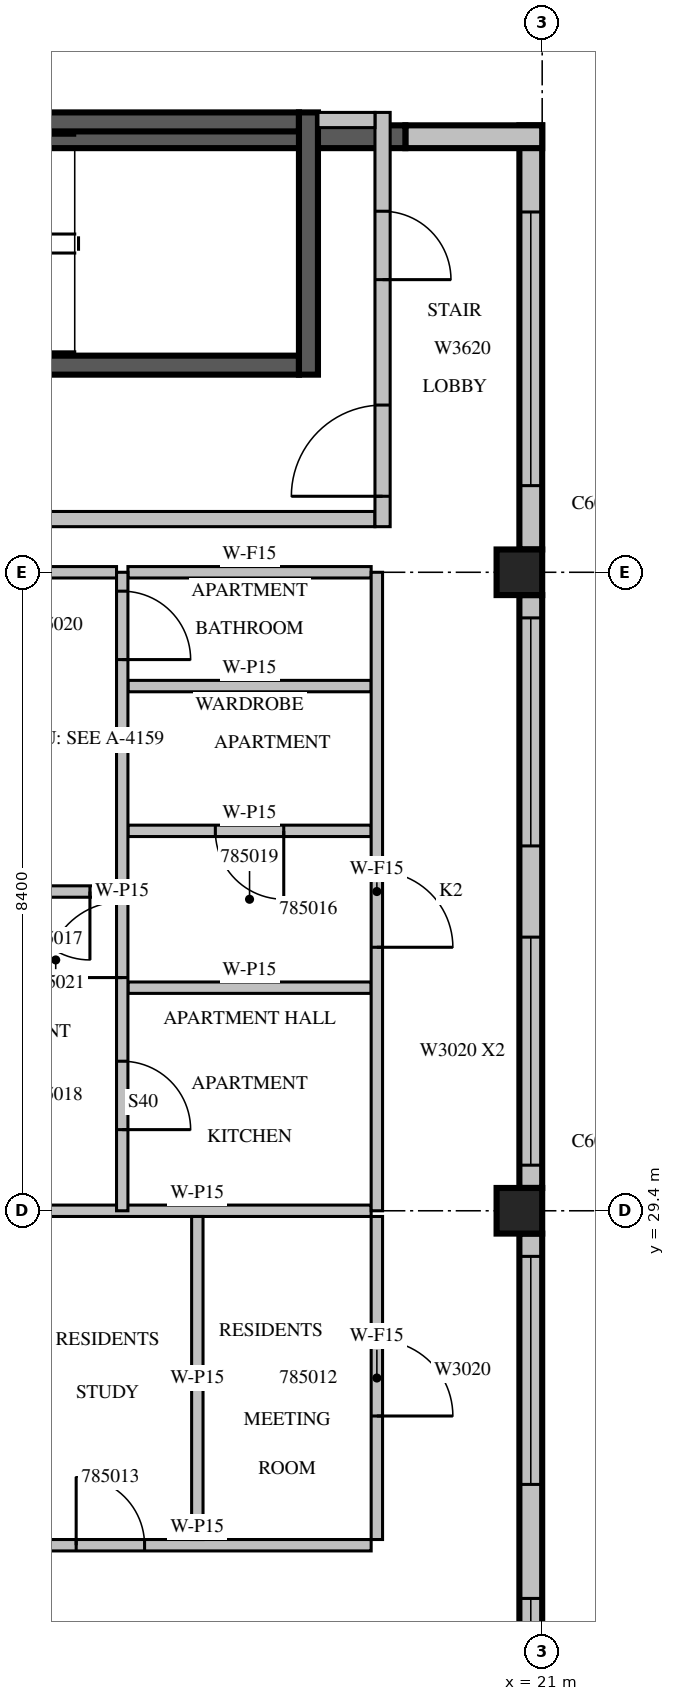
"""IFC4 building model, lengths in metres.
Left out: names, types, materials, properties, quantities, classifications, styles, units other than length and angle.
Written with IfcOpenShell. Run it as: python <this file> out.ifc"""

import sys

from ifc_helpers import new_model, si_unit, direction, frame, frame_2d, origin, origin_2d, place, context, subcontext, project, spatial, rectangle, extrude, source, transform, mapped, element, fill, save


model = new_model("IFC4")
c1 = context("Model", 3, precision=1e-05, world=origin(), true_north=direction((0.0, 1.0)))
c2 = subcontext(c1, "Body", "Model", "MODEL_VIEW")
j1 = project(units=[si_unit("LENGTHUNIT", "METRE"), si_unit("PLANEANGLEUNIT", "RADIAN")], contexts=[c1])
p1 = place(None, origin())
s1 = spatial("IfcSite", under=j1, at=p1, CompositionType="ELEMENT")
p2 = place(p1, origin())
s2 = spatial("IfcBuilding", under=s1, at=p2, CompositionType="ELEMENT")
p3 = place(p2, frame((0.0, 0.0, 358.0)))
s3 = spatial("IfcBuildingStorey", under=s2, at=p3, CompositionType="ELEMENT", Elevation=358.0)
m1 = source(origin(), c2, "Body", "SweptSolid", [
    extrude(rectangle(XDim=0.6, YDim=0.6, at=origin_2d()), origin(), (0.0, 0.0, 1.0), 3.5),
])
for number, where, z_axis, x_axis in (
    (1, (20.7, 29.4, 0.0), (0.0, 0.0, 1.0), (1.0, 0.0, 0.0)),
    (2, (20.7, 37.8, 0.0), (0.0, 0.0, 1.0), (1.0, 0.0, 0.0)),
):
    element("IfcColumn", number, at=place(p3, frame(where, z_axis=z_axis, x_axis=x_axis)), inside=s3, PredefinedType="COLUMN", context=c2, shape_type="MappedRepresentation", body=[
        mapped(m1, transform((0.0, 0.0, 0.0), scale=1.0)),
    ])
m2 = source(origin(), c2, "Body", "SweptSolid", [
    extrude(rectangle(XDim=7.5, YDim=0.3, at=frame_2d((3.75, 0.0))), origin(), (0.0, 0.0, 1.0), 3.1),
])
p4 = place(p3, frame((20.85, 21.6, 0.0), z_axis=(0.0, 0.0, 1.0), x_axis=(0.0, 1.0, 0.0)))
e3 = element("IfcWall", 3, at=p4, inside=s3, PredefinedType="STANDARD", context=c2, shape_type="MappedRepresentation", body=[
    mapped(m2, transform((0.0, 0.0, 0.0), scale=1.0)),
])
m3 = source(origin(), c2, "Body", "SweptSolid", [
    extrude(rectangle(XDim=2.4, YDim=2.0, at=frame_2d((1.2, 1.0))), frame((0.0, 0.16, 0.0), z_axis=(0.0, -1.0, 0.0), x_axis=(1.0, 0.0, 0.0)), (0.0, 0.0, 1.0), 0.32),
])
p5 = place(p4, frame((0.3, 0.0, 0.6)))
e4 = element("IfcOpeningElement", 4, at=p5, cuts=e3, PredefinedType="OPENING", context=c2, shape_type="MappedRepresentation", body=[
    mapped(m3, transform((0.0, 0.0, 0.0), scale=1.0)),
])
m4 = source(origin(), c2, "Body", "SweptSolid", [
    extrude(rectangle(XDim=3.0, YDim=2.0, at=frame_2d((1.5, 1.0))), frame((0.0, 0.16, 0.0), z_axis=(0.0, -1.0, 0.0), x_axis=(1.0, 0.0, 0.0)), (0.0, 0.0, 1.0), 0.32),
])
p6 = place(p4, frame((4.2, 0.0, 0.6)))
e5 = element("IfcOpeningElement", 5, at=p6, cuts=e3, PredefinedType="OPENING", context=c2, shape_type="MappedRepresentation", body=[
    mapped(m4, transform((0.0, 0.0, 0.0), scale=1.0)),
])
m5 = source(origin(), c2, "Body", "SweptSolid", [
    extrude(rectangle(XDim=7.8, YDim=0.3, at=frame_2d((3.9, 0.0))), origin(), (0.0, 0.0, 1.0), 3.1),
])
p7 = place(p3, frame((20.85, 29.7, 0.0), z_axis=(0.0, 0.0, 1.0), x_axis=(0.0, 1.0, 0.0)))
e6 = element("IfcWall", 6, at=p7, inside=s3, PredefinedType="STANDARD", context=c2, shape_type="MappedRepresentation", body=[
    mapped(m5, transform((0.0, 0.0, 0.0), scale=1.0)),
])
p8 = place(p7, frame((0.3, 0.0, 0.6)))
e7 = element("IfcOpeningElement", 7, at=p8, cuts=e6, PredefinedType="OPENING", context=c2, shape_type="MappedRepresentation", body=[
    mapped(m4, transform((0.0, 0.0, 0.0), scale=1.0)),
])
p9 = place(p7, frame((4.5, 0.0, 0.6)))
e8 = element("IfcOpeningElement", 8, at=p9, cuts=e6, PredefinedType="OPENING", context=c2, shape_type="MappedRepresentation", body=[
    mapped(m4, transform((0.0, 0.0, 0.0), scale=1.0)),
])
m6 = source(origin(), c2, "Body", "SweptSolid", [
    extrude(rectangle(XDim=5.58, YDim=0.3, at=frame_2d((2.79, 0.0))), origin(), (0.0, 0.0, 1.0), 3.1),
])
p10 = place(p3, frame((20.85, 38.1, 0.0), z_axis=(0.0, 0.0, 1.0), x_axis=(0.0, 1.0, 0.0)))
e9 = element("IfcWall", 9, at=p10, inside=s3, PredefinedType="STANDARD", context=c2, shape_type="MappedRepresentation", body=[
    mapped(m6, transform((0.0, 0.0, 0.0), scale=1.0)),
])
m7 = source(origin(), c2, "Body", "SweptSolid", [
    extrude(rectangle(XDim=3.6, YDim=2.0, at=frame_2d((1.8, 1.0))), frame((0.0, 0.16, 0.0), z_axis=(0.0, -1.0, 0.0), x_axis=(1.0, 0.0, 0.0)), (0.0, 0.0, 1.0), 0.32),
])
p11 = place(p10, frame((0.84, 0.0, 0.6)))
e10 = element("IfcOpeningElement", 10, at=p11, cuts=e9, PredefinedType="OPENING", context=c2, shape_type="MappedRepresentation", body=[
    mapped(m7, transform((0.0, 0.0, 0.0), scale=1.0)),
])
m8 = source(origin(), c2, "Body", "SweptSolid", [
    extrude(rectangle(XDim=1.8, YDim=0.3, at=frame_2d((0.9, 0.0))), origin(), (0.0, 0.0, 1.0), 3.1),
])
p12 = place(p3, frame((21.0, 43.53, 0.0), z_axis=(0.0, 0.0, 1.0), x_axis=(-1.0, 0.0, 0.0)))
e11 = element("IfcWall", 11, at=p12, inside=s3, PredefinedType="STANDARD", context=c2, shape_type="MappedRepresentation", body=[
    mapped(m8, transform((0.0, 0.0, 0.0), scale=1.0)),
])
m9 = source(origin(), c2, "Body", "SweptSolid", [
    extrude(rectangle(XDim=8.6, YDim=0.3, at=frame_2d((4.3, 0.0))), origin(), (0.0, 0.0, 1.0), 3.1),
])
p13 = place(p3, frame((19.2, 43.53, 0.0), z_axis=(0.0, 0.0, 1.0), x_axis=(-1.0, 0.0, 0.0)))
e12 = element("IfcWall", 12, at=p13, inside=s3, PredefinedType="SOLIDWALL", context=c2, shape_type="MappedRepresentation", body=[
    mapped(m9, transform((0.0, 0.0, 0.0), scale=1.0)),
])
m10 = source(origin(), c2, "Body", "SweptSolid", [
    extrude(rectangle(XDim=7.0, YDim=0.25, at=frame_2d((3.5, 0.0))), origin(), (0.0, 0.0, 1.0), 3.1),
])
p14 = place(p3, frame((10.8, 40.525, 0.0), z_axis=(0.0, 0.0, 1.0), x_axis=(1.0, 0.0, 0.0)))
e13 = element("IfcWall", 13, at=p14, inside=s3, PredefinedType="SOLIDWALL", context=c2, shape_type="MappedRepresentation", body=[
    mapped(m10, transform((0.0, 0.0, 0.0), scale=1.0)),
])
m11 = source(origin(), c2, "Body", "SweptSolid", [
    extrude(rectangle(XDim=1.1, YDim=2.1, at=frame_2d((0.55, 1.05))), frame((0.0, 0.135, 0.0), z_axis=(0.0, -1.0, 0.0), x_axis=(1.0, 0.0, 0.0)), (0.0, 0.0, 1.0), 0.27),
])
p15 = place(p14, frame((0.55, 0.0, 0.0)))
e14 = element("IfcOpeningElement", 14, at=p15, cuts=e13, PredefinedType="OPENING", context=c2, shape_type="MappedRepresentation", body=[
    mapped(m11, transform((0.0, 0.0, 0.0), scale=1.0)),
])
p16 = place(p3, frame((10.8, 43.725, 0.0), z_axis=(0.0, 0.0, 1.0), x_axis=(1.0, 0.0, 0.0)))
e15 = element("IfcWall", 15, at=p16, inside=s3, PredefinedType="SOLIDWALL", context=c2, shape_type="MappedRepresentation", body=[
    mapped(m10, transform((0.0, 0.0, 0.0), scale=1.0)),
])
m12 = source(origin(), c2, "Body", "SweptSolid", [
    extrude(rectangle(XDim=3.45, YDim=0.25, at=frame_2d((1.725, 0.0))), origin(), (0.0, 0.0, 1.0), 3.1),
])
p17 = place(p3, frame((17.925, 40.4, 0.0), z_axis=(0.0, 0.0, 1.0), x_axis=(0.0, 1.0, 0.0)))
e16 = element("IfcWall", 16, at=p17, inside=s3, PredefinedType="SOLIDWALL", context=c2, shape_type="MappedRepresentation", body=[
    mapped(m12, transform((0.0, 0.0, 0.0), scale=1.0)),
])
m13 = source(origin(), c2, "Body", "SweptSolid", [
    extrude(rectangle(XDim=8.0, YDim=0.2, at=frame_2d((4.0, 0.0))), origin(), (0.0, 0.0, 1.0), 3.1),
])
p18 = place(p3, frame((10.8, 38.5, 0.0), z_axis=(0.0, 0.0, 1.0), x_axis=(1.0, 0.0, 0.0)))
e17 = element("IfcWall", 17, at=p18, inside=s3, PredefinedType="PARTITIONING", context=c2, shape_type="MappedRepresentation", body=[
    mapped(m13, transform((0.0, 0.0, 0.0), scale=1.0)),
])
m14 = source(origin(), c2, "Body", "SweptSolid", [
    extrude(rectangle(XDim=5.45, YDim=0.2, at=frame_2d((2.725, 0.0))), origin(), (0.0, 0.0, 1.0), 3.1),
])
p19 = place(p3, frame((18.9, 38.4, 0.0), z_axis=(0.0, 0.0, 1.0), x_axis=(0.0, 1.0, 0.0)))
e18 = element("IfcWall", 18, at=p19, inside=s3, PredefinedType="PARTITIONING", context=c2, shape_type="MappedRepresentation", body=[
    mapped(m14, transform((0.0, 0.0, 0.0), scale=1.0)),
])
m15 = source(origin(), c2, "Body", "SweptSolid", [
    extrude(rectangle(XDim=1.2, YDim=2.1, at=frame_2d((0.6, 1.05))), frame((0.0, 0.11, 0.0), z_axis=(0.0, -1.0, 0.0), x_axis=(1.0, 0.0, 0.0)), (0.0, 0.0, 1.0), 0.22),
])
p20 = place(p19, frame((0.4, 0.0, 0.0)))
e19 = element("IfcOpeningElement", 19, at=p20, cuts=e18, PredefinedType="OPENING", context=c2, shape_type="MappedRepresentation", body=[
    mapped(m15, transform((0.0, 0.0, 0.0), scale=1.0)),
])
m16 = source(origin(), c2, "Body", "SweptSolid", [
    extrude(rectangle(XDim=0.9, YDim=2.1, at=frame_2d((0.45, 1.05))), frame((0.0, 0.11, 0.0), z_axis=(0.0, -1.0, 0.0), x_axis=(1.0, 0.0, 0.0)), (0.0, 0.0, 1.0), 0.22),
])
p21 = place(p19, frame((3.25, 0.0, 0.0)))
e20 = element("IfcOpeningElement", 20, at=p21, cuts=e18, PredefinedType="OPENING", context=c2, shape_type="MappedRepresentation", body=[
    mapped(m16, transform((0.0, 0.0, 0.0), scale=1.0)),
])
m17 = source(origin(), c2, "Body", "SweptSolid", [
    extrude(rectangle(XDim=0.75, YDim=0.2, at=frame_2d((0.375, 0.0))), origin(), (0.0, 0.0, 1.0), 3.1),
])
p22 = place(p3, frame((18.05, 43.75, 0.0), z_axis=(0.0, 0.0, 1.0), x_axis=(1.0, 0.0, 0.0)))
e21 = element("IfcWall", 21, at=p22, inside=s3, PredefinedType="PARTITIONING", context=c2, shape_type="MappedRepresentation", body=[
    mapped(m17, transform((0.0, 0.0, 0.0), scale=1.0)),
])
m18 = source(origin(), c2, "Body", "SweptSolid", [
    extrude(rectangle(XDim=4.575, YDim=0.15, at=frame_2d((2.288, 0.0))), origin(), (0.0, 0.0, 1.0), 3.1),
])
p23 = place(p3, frame((14.175, 25.0, 0.0), z_axis=(0.0, 0.0, 1.0), x_axis=(1.0, 0.0, 0.0)))
e22 = element("IfcWall", 22, at=p23, inside=s3, PredefinedType="PARTITIONING", context=c2, shape_type="MappedRepresentation", body=[
    mapped(m18, transform((0.0, 0.0, 0.0), scale=1.0)),
])
m19 = source(origin(), c2, "Body", "SweptSolid", [
    extrude(rectangle(XDim=0.9, YDim=2.1, at=frame_2d((0.45, 1.05))), frame((0.0, 0.085, 0.0), z_axis=(0.0, -1.0, 0.0), x_axis=(1.0, 0.0, 0.0)), (0.0, 0.0, 1.0), 0.17),
])
p24 = place(p23, frame((0.694, 0.0, 0.0)))
e23 = element("IfcOpeningElement", 23, at=p24, cuts=e22, PredefinedType="OPENING", context=c2, shape_type="MappedRepresentation", body=[
    mapped(m19, transform((0.0, 0.0, 0.0), scale=1.0)),
])
p25 = place(p3, frame((18.75, 29.4, 0.0), z_axis=(0.0, 0.0, 1.0), x_axis=(-1.0, 0.0, 0.0)))
e24 = element("IfcWall", 24, at=p25, inside=s3, PredefinedType="PARTITIONING", context=c2, shape_type="MappedRepresentation", body=[
    mapped(m18, transform((0.0, 0.0, 0.0), scale=1.0)),
])
m20 = source(origin(), c2, "Body", "SweptSolid", [
    extrude(rectangle(XDim=4.25, YDim=0.15, at=frame_2d((2.125, 0.0))), origin(), (0.0, 0.0, 1.0), 3.1),
])
p26 = place(p3, frame((18.825, 25.075, 0.0), z_axis=(0.0, 0.0, 1.0), x_axis=(0.0, 1.0, 0.0)))
e25 = element("IfcWall", 25, at=p26, inside=s3, PredefinedType="PARTITIONING", context=c2, shape_type="MappedRepresentation", body=[
    mapped(m20, transform((0.0, 0.0, 0.0), scale=1.0)),
])
m21 = source(origin(), c2, "Body", "SweptSolid", [
    extrude(rectangle(XDim=1.0, YDim=2.1, at=frame_2d((0.5, 1.05))), frame((0.0, 0.085, 0.0), z_axis=(0.0, -1.0, 0.0), x_axis=(1.0, 0.0, 0.0)), (0.0, 0.0, 1.0), 0.17),
])
p27 = place(p26, frame((1.625, 0.0, 0.0)))
e26 = element("IfcOpeningElement", 26, at=p27, cuts=e25, PredefinedType="OPENING", context=c2, shape_type="MappedRepresentation", body=[
    mapped(m21, transform((0.0, 0.0, 0.0), scale=1.0)),
])
p28 = place(p3, frame((16.463, 25.075, 0.0), z_axis=(0.0, 0.0, 1.0), x_axis=(0.0, 1.0, 0.0)))
e27 = element("IfcWall", 27, at=p28, inside=s3, PredefinedType="PARTITIONING", context=c2, shape_type="MappedRepresentation", body=[
    mapped(m20, transform((0.0, 0.0, 0.0), scale=1.0)),
])
p29 = place(p3, frame((15.4, 33.6, 0.0), z_axis=(0.0, 0.0, 1.0), x_axis=(-1.0, 0.0, 0.0)))
e28 = element("IfcWall", 28, at=p29, inside=s3, PredefinedType="PARTITIONING", context=c2, shape_type="SweptSolid", body=[
    extrude(rectangle(XDim=4.6, YDim=0.15, at=frame_2d((2.3, 0.0))), origin(), (0.0, 0.0, 1.0), 3.1),
])
p30 = place(p29, frame((0.35, 0.0, 0.0)))
e29 = element("IfcOpeningElement", 29, at=p30, cuts=e28, PredefinedType="OPENING", context=c2, shape_type="MappedRepresentation", body=[
    mapped(m19, transform((0.0, 0.0, 0.0), scale=1.0)),
])
m22 = source(origin(), c2, "Body", "SweptSolid", [
    extrude(rectangle(XDim=3.2, YDim=0.15, at=frame_2d((1.6, 0.0))), origin(), (0.0, 0.0, 1.0), 3.1),
])
p31 = place(p3, frame((18.75, 32.335, 0.0), z_axis=(0.0, 0.0, 1.0), x_axis=(-1.0, 0.0, 0.0)))
e30 = element("IfcWall", 30, at=p31, inside=s3, PredefinedType="PARTITIONING", context=c2, shape_type="MappedRepresentation", body=[
    mapped(m22, transform((0.0, 0.0, 0.0), scale=1.0)),
])
p32 = place(p3, frame((18.75, 34.398, 0.0), z_axis=(0.0, 0.0, 1.0), x_axis=(-1.0, 0.0, 0.0)))
e31 = element("IfcWall", 31, at=p32, inside=s3, PredefinedType="PARTITIONING", context=c2, shape_type="MappedRepresentation", body=[
    mapped(m22, transform((0.0, 0.0, 0.0), scale=1.0)),
])
p33 = place(p32, frame((1.15, 0.0, 0.0)))
e32 = element("IfcOpeningElement", 32, at=p33, cuts=e31, PredefinedType="OPENING", context=c2, shape_type="MappedRepresentation", body=[
    mapped(m19, transform((0.0, 0.0, 0.0), scale=1.0)),
])
p34 = place(p3, frame((18.75, 36.303, 0.0), z_axis=(0.0, 0.0, 1.0), x_axis=(-1.0, 0.0, 0.0)))
e33 = element("IfcWall", 33, at=p34, inside=s3, PredefinedType="PARTITIONING", context=c2, shape_type="MappedRepresentation", body=[
    mapped(m22, transform((0.0, 0.0, 0.0), scale=1.0)),
])
m23 = source(origin(), c2, "Body", "SweptSolid", [
    extrude(rectangle(XDim=4.301, YDim=0.15, at=frame_2d((2.151, 0.0))), origin(), (0.0, 0.0, 1.0), 3.1),
])
p35 = place(p3, frame((15.4, 37.8, 0.0), z_axis=(0.0, 0.0, 1.0), x_axis=(-1.0, 0.0, 0.0)))
e34 = element("IfcWall", 34, at=p35, inside=s3, PredefinedType="PARTITIONING", context=c2, shape_type="MappedRepresentation", body=[
    mapped(m23, transform((0.0, 0.0, 0.0), scale=1.0)),
])
p36 = place(p3, frame((18.75, 37.8, 0.0), z_axis=(0.0, 0.0, 1.0), x_axis=(-1.0, 0.0, 0.0)))
e35 = element("IfcWall", 35, at=p36, inside=s3, PredefinedType="PARTITIONING", context=c2, shape_type="MappedRepresentation", body=[
    mapped(m22, transform((0.0, 0.0, 0.0), scale=1.0)),
])
m24 = source(origin(), c2, "Body", "SweptSolid", [
    extrude(rectangle(XDim=8.4, YDim=0.15, at=frame_2d((4.2, 0.0))), origin(), (0.0, 0.0, 1.0), 3.1),
])
p37 = place(p3, frame((15.475, 29.4, 0.0), z_axis=(0.0, 0.0, 1.0), x_axis=(0.0, 1.0, 0.0)))
e36 = element("IfcWall", 36, at=p37, inside=s3, PredefinedType="PARTITIONING", context=c2, shape_type="MappedRepresentation", body=[
    mapped(m24, transform((0.0, 0.0, 0.0), scale=1.0)),
])
p38 = place(p37, frame((3.068, 0.0, 0.0)))
e37 = element("IfcOpeningElement", 37, at=p38, cuts=e36, PredefinedType="OPENING", context=c2, shape_type="MappedRepresentation", body=[
    mapped(m21, transform((0.0, 0.0, 0.0), scale=1.0)),
])
p39 = place(p37, frame((1.067, 0.0, 0.0)))
e38 = element("IfcOpeningElement", 38, at=p39, cuts=e36, PredefinedType="OPENING", context=c2, shape_type="MappedRepresentation", body=[
    mapped(m19, transform((0.0, 0.0, 0.0), scale=1.0)),
])
p40 = place(p37, frame((7.252, 0.0, 0.0)))
e39 = element("IfcOpeningElement", 39, at=p40, cuts=e36, PredefinedType="OPENING", context=c2, shape_type="MappedRepresentation", body=[
    mapped(m19, transform((0.0, 0.0, 0.0), scale=1.0)),
])
p41 = place(p3, frame((18.825, 29.4, 0.0), z_axis=(0.0, 0.0, 1.0), x_axis=(0.0, 1.0, 0.0)))
e40 = element("IfcWall", 40, at=p41, inside=s3, PredefinedType="PARTITIONING", context=c2, shape_type="MappedRepresentation", body=[
    mapped(m24, transform((0.0, 0.0, 0.0), scale=1.0)),
])
p42 = place(p41, frame((3.467, 0.0, 0.0)))
e41 = element("IfcOpeningElement", 41, at=p42, cuts=e40, PredefinedType="OPENING", context=c2, shape_type="MappedRepresentation", body=[
    mapped(m21, transform((0.0, 0.0, 0.0), scale=1.0)),
])
m25 = source(origin(), c2, "Body", "SweptSolid", [
    extrude(rectangle(XDim=2.4, YDim=2.0, at=frame_2d((1.2, 1.0))), frame((0.0, 0.03, 0.0), z_axis=(0.0, -1.0, 0.0), x_axis=(1.0, 0.0, 0.0)), (0.0, 0.0, 1.0), 0.06),
])
p43 = place(p5, origin())
e42 = element("IfcWindow", 42, at=p43, inside=s3, PartitioningType="SINGLE_PANEL", PredefinedType="WINDOW", context=c2, shape_type="MappedRepresentation", body=[
    mapped(m25, transform((0.0, 0.0, 0.0), scale=1.0)),
])
fill(e4, e42)
m26 = source(origin(), c2, "Body", "SweptSolid", [
    extrude(rectangle(XDim=3.0, YDim=2.0, at=frame_2d((1.5, 1.0))), frame((0.0, 0.03, 0.0), z_axis=(0.0, -1.0, 0.0), x_axis=(1.0, 0.0, 0.0)), (0.0, 0.0, 1.0), 0.06),
])
p44 = place(p6, origin())
e43 = element("IfcWindow", 43, at=p44, inside=s3, PartitioningType="SINGLE_PANEL", PredefinedType="WINDOW", context=c2, shape_type="MappedRepresentation", body=[
    mapped(m26, transform((0.0, 0.0, 0.0), scale=1.0)),
])
fill(e5, e43)
p45 = place(p8, origin())
e44 = element("IfcWindow", 44, at=p45, inside=s3, PartitioningType="SINGLE_PANEL", PredefinedType="WINDOW", context=c2, shape_type="MappedRepresentation", body=[
    mapped(m26, transform((0.0, 0.0, 0.0), scale=1.0)),
])
fill(e7, e44)
p46 = place(p9, origin())
e45 = element("IfcWindow", 45, at=p46, inside=s3, PartitioningType="SINGLE_PANEL", PredefinedType="WINDOW", context=c2, shape_type="MappedRepresentation", body=[
    mapped(m26, transform((0.0, 0.0, 0.0), scale=1.0)),
])
fill(e8, e45)
m27 = source(origin(), c2, "Body", "SweptSolid", [
    extrude(rectangle(XDim=3.6, YDim=2.0, at=frame_2d((1.8, 1.0))), frame((0.0, 0.03, 0.0), z_axis=(0.0, -1.0, 0.0), x_axis=(1.0, 0.0, 0.0)), (0.0, 0.0, 1.0), 0.06),
])
p47 = place(p11, origin())
e46 = element("IfcWindow", 46, at=p47, inside=s3, PartitioningType="SINGLE_PANEL", PredefinedType="WINDOW", context=c2, shape_type="MappedRepresentation", body=[
    mapped(m27, transform((0.0, 0.0, 0.0), scale=1.0)),
])
fill(e10, e46)
m28 = source(origin(), c2, "Body", "SweptSolid", [
    extrude(rectangle(XDim=1.2, YDim=2.1, at=frame_2d((0.6, 1.05))), frame((0.0, 0.025, 0.0), z_axis=(0.0, -1.0, 0.0), x_axis=(1.0, 0.0, 0.0)), (0.0, 0.0, 1.0), 0.05),
])
p48 = place(p20, origin())
e47 = element("IfcDoor", 47, at=p48, inside=s3, OperationType="SINGLE_SWING_LEFT", PredefinedType="DOOR", context=c2, shape_type="MappedRepresentation", body=[
    mapped(m28, transform((0.0, 0.0, 0.0), scale=1.0)),
])
fill(e19, e47)
m29 = source(origin(), c2, "Body", "SweptSolid", [
    extrude(rectangle(XDim=0.9, YDim=2.1, at=frame_2d((0.45, 1.05))), frame((0.0, 0.025, 0.0), z_axis=(0.0, -1.0, 0.0), x_axis=(1.0, 0.0, 0.0)), (0.0, 0.0, 1.0), 0.05),
])
p49 = place(p21, origin())
e48 = element("IfcDoor", 48, at=p49, inside=s3, OperationType="SINGLE_SWING_RIGHT", PredefinedType="DOOR", context=c2, shape_type="MappedRepresentation", body=[
    mapped(m29, transform((0.0, 0.0, 0.0), scale=1.0)),
])
fill(e20, e48)
m30 = source(origin(), c2, "Body", "SweptSolid", [
    extrude(rectangle(XDim=1.0, YDim=2.1, at=frame_2d((0.5, 1.05))), frame((0.0, 0.025, 0.0), z_axis=(0.0, -1.0, 0.0), x_axis=(1.0, 0.0, 0.0)), (0.0, 0.0, 1.0), 0.05),
])
p50 = place(p27, origin())
e49 = element("IfcDoor", 49, at=p50, inside=s3, OperationType="SINGLE_SWING_RIGHT", PredefinedType="DOOR", context=c2, shape_type="MappedRepresentation", body=[
    mapped(m30, transform((0.0, 0.0, 0.0), scale=1.0)),
])
fill(e26, e49)
p51 = place(p24, origin())
e50 = element("IfcDoor", 50, at=p51, inside=s3, OperationType="SINGLE_SWING_LEFT", PredefinedType="DOOR", context=c2, shape_type="MappedRepresentation", body=[
    mapped(m29, transform((0.0, 0.0, 0.0), scale=1.0)),
])
fill(e23, e50)
p52 = place(p42, origin())
e51 = element("IfcDoor", 51, at=p52, inside=s3, OperationType="SINGLE_SWING_RIGHT", PredefinedType="DOOR", context=c2, shape_type="MappedRepresentation", body=[
    mapped(m30, transform((0.0, 0.0, 0.0), scale=1.0)),
])
fill(e41, e51)
p53 = place(p38, origin())
e52 = element("IfcDoor", 52, at=p53, inside=s3, OperationType="SINGLE_SWING_LEFT", PredefinedType="DOOR", context=c2, shape_type="MappedRepresentation", body=[
    mapped(m30, transform((0.0, 0.0, 0.0), scale=1.0)),
])
fill(e37, e52)
p54 = place(p39, origin())
e53 = element("IfcDoor", 53, at=p54, inside=s3, OperationType="SINGLE_SWING_RIGHT", PredefinedType="DOOR", context=c2, shape_type="MappedRepresentation", body=[
    mapped(m29, transform((0.0, 0.0, 0.0), scale=1.0)),
])
fill(e38, e53)
p55 = place(p33, origin())
e54 = element("IfcDoor", 54, at=p55, inside=s3, OperationType="SINGLE_SWING_LEFT", PredefinedType="DOOR", context=c2, shape_type="MappedRepresentation", body=[
    mapped(m29, transform((0.0, 0.0, 0.0), scale=1.0)),
])
fill(e32, e54)
p56 = place(p40, origin())
e55 = element("IfcDoor", 55, at=p56, inside=s3, OperationType="SINGLE_SWING_RIGHT", PredefinedType="DOOR", context=c2, shape_type="MappedRepresentation", body=[
    mapped(m29, transform((0.0, 0.0, 0.0), scale=1.0)),
])
fill(e39, e55)
p57 = place(p30, origin())
e56 = element("IfcDoor", 56, at=p57, inside=s3, OperationType="SINGLE_SWING_LEFT", PredefinedType="DOOR", context=c2, shape_type="MappedRepresentation", body=[
    mapped(m29, transform((0.0, 0.0, 0.0), scale=1.0)),
])
fill(e29, e56)
save(model, sys.argv[1])
